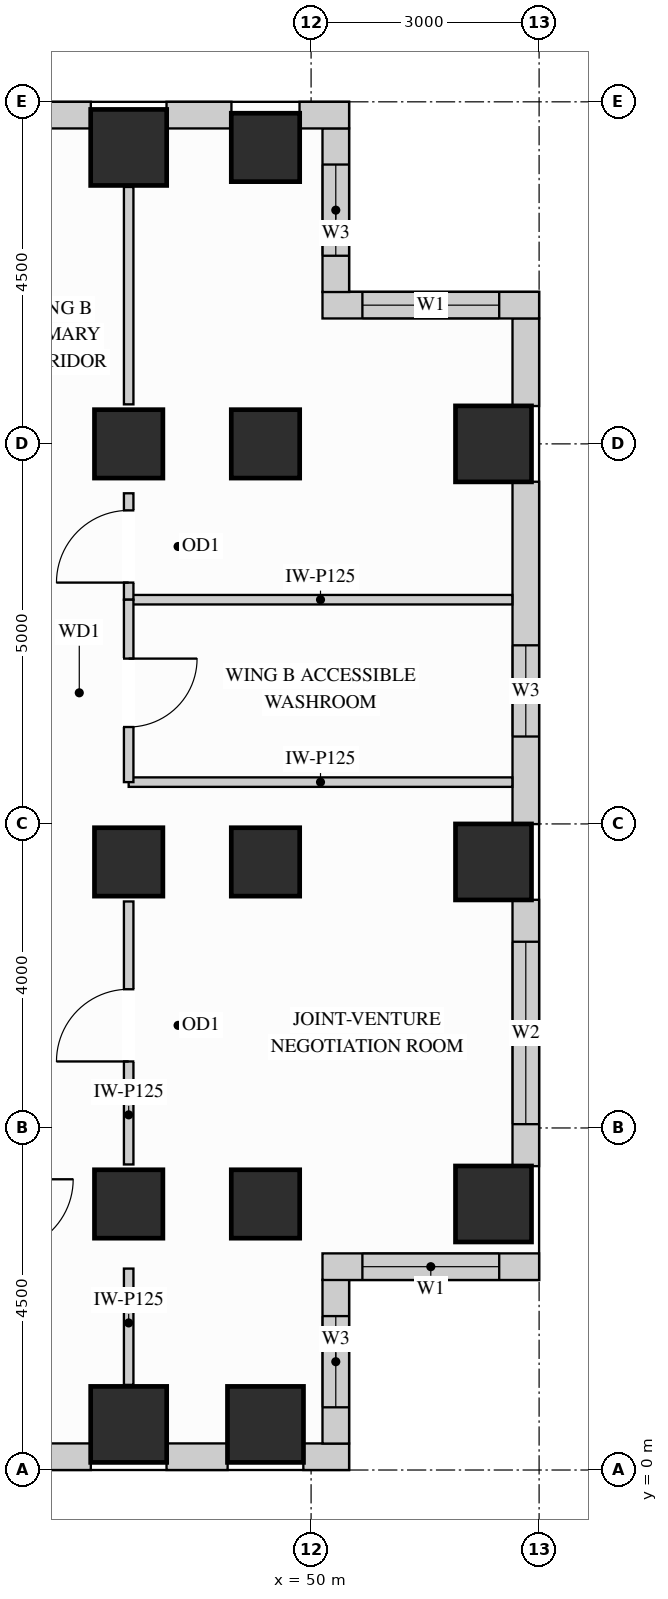
"""IFC4 building model, lengths in metres.
Left out: names, types, materials, properties, quantities, classifications, styles, units other than length and angle.
Written with IfcOpenShell. Run it as: python <this file> out.ifc"""

import sys

from ifc_helpers import new_model, si_unit, direction, frame, frame_2d, origin, origin_2d, place, context, subcontext, project, spatial, rectangle, extrude, source, transform, mapped, element, fill, save


model = new_model("IFC4")
c1 = context("Model", 3, precision=1e-05, world=origin(), true_north=direction((0.0, 1.0)))
c2 = subcontext(c1, "Body", "Model", "MODEL_VIEW")
j1 = project(units=[si_unit("LENGTHUNIT", "METRE"), si_unit("PLANEANGLEUNIT", "RADIAN")], contexts=[c1])
p1 = place(None, origin())
s1 = spatial("IfcSite", under=j1, at=p1, CompositionType="ELEMENT")
p2 = place(p1, origin())
s2 = spatial("IfcBuilding", under=s1, at=p2, CompositionType="ELEMENT")
p3 = place(p2, frame((0.0, 0.0, 164.7)))
s3 = spatial("IfcBuildingStorey", under=s2, at=p3, CompositionType="ELEMENT", Elevation=164.7)
m1 = source(origin(), c2, "Body", "SweptSolid", [
    extrude(rectangle(XDim=0.9, YDim=0.9, at=origin_2d()), origin(), (0.0, 0.0, 1.0), 3.4),
])
for number, where, z_axis, x_axis in (
    (1, (47.6, 13.5, 0.0), (0.0, 0.0, 1.0), (1.0, 0.0, 0.0)),
    (2, (47.6, 3.5, 0.0), (0.0, 0.0, 1.0), (1.0, 0.0, 0.0)),
    (3, (47.6, 8.0, 0.0), (0.0, 0.0, 1.0), (1.0, 0.0, 0.0)),
    (4, (49.4, 13.5, 0.0), (0.0, 0.0, 1.0), (1.0, 0.0, 0.0)),
    (5, (49.4, 17.4, 0.0), (0.0, 0.0, 1.0), (1.0, 0.0, 0.0)),
    (6, (49.4, 3.5, 0.0), (0.0, 0.0, 1.0), (1.0, 0.0, 0.0)),
    (7, (49.4, 8.0, 0.0), (0.0, 0.0, 1.0), (1.0, 0.0, 0.0)),
):
    element("IfcColumn", number, at=place(p3, frame(where, z_axis=z_axis, x_axis=x_axis)), inside=s3, PredefinedType="COLUMN", context=c2, shape_type="MappedRepresentation", body=[
        mapped(m1, transform((0.0, 0.0, 0.0), x_axis=(1.0, 0.0, 0.0), y_axis=(0.0, 1.0, 0.0), z_axis=(0.0, 0.0, 1.0))),
    ])
m2 = source(origin(), c2, "Body", "SweptSolid", [
    extrude(rectangle(XDim=1.0, YDim=1.0, at=origin_2d()), origin(), (0.0, 0.0, 1.0), 3.4),
])
for number, where, z_axis, x_axis in (
    (8, (47.6, 17.4, 0.0), (0.0, 0.0, 1.0), (1.0, 0.0, 0.0)),
    (9, (52.4, 13.5, 0.0), (0.0, 0.0, 1.0), (1.0, 0.0, 0.0)),
    (10, (52.4, 3.5, 0.0), (0.0, 0.0, 1.0), (1.0, 0.0, 0.0)),
    (11, (52.4, 8.0, 0.0), (0.0, 0.0, 1.0), (1.0, 0.0, 0.0)),
    (12, (47.6, 0.6, 0.0), (0.0, 0.0, 1.0), (1.0, 0.0, 0.0)),
    (13, (49.4, 0.6, 0.0), (0.0, 0.0, 1.0), (1.0, 0.0, 0.0)),
):
    element("IfcColumn", number, at=place(p3, frame(where, z_axis=z_axis, x_axis=x_axis)), inside=s3, PredefinedType="COLUMN", context=c2, shape_type="MappedRepresentation", body=[
        mapped(m2, transform((0.0, 0.0, 0.0), x_axis=(1.0, 0.0, 0.0), y_axis=(0.0, 1.0, 0.0), z_axis=(0.0, 0.0, 1.0))),
    ])
p4 = place(p3, frame((40.498, 0.175, 0.0), z_axis=(0.0, 0.0, 1.0), x_axis=(1.0, 0.0, 0.0)))
e14 = element("IfcWall", 14, at=p4, inside=s3, PredefinedType="SOLIDWALL", context=c2, shape_type="SweptSolid", body=[
    extrude(rectangle(XDim=6.604, YDim=0.35, at=frame_2d((3.302, 0.0))), origin(), (0.0, 0.0, 1.0), 2.612),
])
p5 = place(p4, frame((0.737, 0.0, 0.78)))
e15 = element("IfcOpeningElement", 15, at=p5, cuts=e14, PredefinedType="OPENING", context=c2, shape_type="SweptSolid", body=[
    extrude(rectangle(XDim=1.8, YDim=1.652, at=frame_2d((0.9, 0.826))), frame((0.0, 0.185, 0.0), z_axis=(0.0, -1.0, 0.0), x_axis=(1.0, 0.0, 0.0)), (0.0, 0.0, 1.0), 0.37),
])
p6 = place(p4, frame((2.955, 0.0, 0.78)))
e16 = element("IfcOpeningElement", 16, at=p6, cuts=e14, PredefinedType="OPENING", context=c2, shape_type="SweptSolid", body=[
    extrude(rectangle(XDim=1.8, YDim=1.652, at=frame_2d((0.9, 0.826))), frame((0.0, 0.185, 0.0), z_axis=(0.0, -1.0, 0.0), x_axis=(1.0, 0.0, 0.0)), (0.0, 0.0, 1.0), 0.37),
])
m3 = source(origin(), c2, "Body", "SweptSolid", [
    extrude(rectangle(XDim=0.804, YDim=0.35, at=frame_2d((0.402, 0.0))), origin(), (0.0, 0.0, 1.0), 3.385),
])
p7 = place(p3, frame((48.098, 0.175, 0.0), z_axis=(0.0, 0.0, 1.0), x_axis=(1.0, 0.0, 0.0)))
e17 = element("IfcWall", 17, at=p7, inside=s3, PredefinedType="SOLIDWALL", context=c2, shape_type="MappedRepresentation", body=[
    mapped(m3, transform((0.0, 0.0, 0.0), x_axis=(1.0, 0.0, 0.0), y_axis=(0.0, 1.0, 0.0), z_axis=(0.0, 0.0, 1.0))),
])
m4 = source(origin(), c2, "Body", "SweptSolid", [
    extrude(rectangle(XDim=0.602, YDim=0.35, at=frame_2d((0.301, 0.0))), origin(), (0.0, 0.0, 1.0), 3.385),
])
p8 = place(p3, frame((49.898, 0.175, 0.0), z_axis=(0.0, 0.0, 1.0), x_axis=(1.0, 0.0, 0.0)))
e18 = element("IfcWall", 18, at=p8, inside=s3, PredefinedType="SOLIDWALL", context=c2, shape_type="MappedRepresentation", body=[
    mapped(m4, transform((0.0, 0.0, 0.0), x_axis=(1.0, 0.0, 0.0), y_axis=(0.0, 1.0, 0.0), z_axis=(0.0, 0.0, 1.0))),
])
p9 = place(p3, frame((50.325, 0.348, 0.0), z_axis=(0.0, 0.0, 1.0), x_axis=(0.0, 1.0, 0.0)))
e19 = element("IfcWall", 19, at=p9, inside=s3, PredefinedType="SOLIDWALL", context=c2, shape_type="SweptSolid", body=[
    extrude(rectangle(XDim=2.154, YDim=0.35, at=frame_2d((1.077, 0.0))), origin(), (0.0, 0.0, 1.0), 3.385),
])
p10 = place(p9, frame((0.477, 0.0, 0.78)))
e20 = element("IfcOpeningElement", 20, at=p10, cuts=e19, PredefinedType="OPENING", context=c2, shape_type="SweptSolid", body=[
    extrude(rectangle(XDim=1.2, YDim=2.1, at=frame_2d((0.6, 1.05))), frame((0.0, 0.185, 0.0), z_axis=(0.0, -1.0, 0.0), x_axis=(1.0, 0.0, 0.0)), (0.0, 0.0, 1.0), 0.37),
])
p11 = place(p3, frame((50.15, 2.675, 0.0), z_axis=(0.0, 0.0, 1.0), x_axis=(1.0, 0.0, 0.0)))
e21 = element("IfcWall", 21, at=p11, inside=s3, PredefinedType="SOLIDWALL", context=c2, shape_type="SweptSolid", body=[
    extrude(rectangle(XDim=2.85, YDim=0.35, at=frame_2d((1.425, 0.0))), origin(), (0.0, 0.0, 1.0), 3.385),
])
p12 = place(p11, frame((0.525, 0.0, 0.78)))
e22 = element("IfcOpeningElement", 22, at=p12, cuts=e21, PredefinedType="OPENING", context=c2, shape_type="SweptSolid", body=[
    extrude(rectangle(XDim=1.8, YDim=2.1, at=frame_2d((0.9, 1.05))), frame((0.0, 0.185, 0.0), z_axis=(0.0, -1.0, 0.0), x_axis=(1.0, 0.0, 0.0)), (0.0, 0.0, 1.0), 0.37),
])
p13 = place(p3, frame((52.825, 3.998, 0.0), z_axis=(0.0, 0.0, 1.0), x_axis=(0.0, 1.0, 0.0)))
e23 = element("IfcWall", 23, at=p13, inside=s3, PredefinedType="SOLIDWALL", context=c2, shape_type="SweptSolid", body=[
    extrude(rectangle(XDim=3.504, YDim=0.35, at=frame_2d((1.752, 0.0))), origin(), (0.0, 0.0, 1.0), 2.612),
])
p14 = place(p13, frame((0.552, 0.0, 0.78)))
e24 = element("IfcOpeningElement", 24, at=p14, cuts=e23, PredefinedType="OPENING", context=c2, shape_type="SweptSolid", body=[
    extrude(rectangle(XDim=2.4, YDim=1.652, at=frame_2d((1.2, 0.826))), frame((0.0, 0.185, 0.0), z_axis=(0.0, -1.0, 0.0), x_axis=(1.0, 0.0, 0.0)), (0.0, 0.0, 1.0), 0.37),
])
p15 = place(p3, frame((52.825, 8.498, 0.0), z_axis=(0.0, 0.0, 1.0), x_axis=(0.0, 1.0, 0.0)))
e25 = element("IfcWall", 25, at=p15, inside=s3, PredefinedType="SOLIDWALL", context=c2, shape_type="SweptSolid", body=[
    extrude(rectangle(XDim=4.504, YDim=0.35, at=frame_2d((2.252, 0.0))), origin(), (0.0, 0.0, 1.0), 2.612),
])
p16 = place(p15, frame((1.152, 0.0, 0.78)))
e26 = element("IfcOpeningElement", 26, at=p16, cuts=e25, PredefinedType="OPENING", context=c2, shape_type="SweptSolid", body=[
    extrude(rectangle(XDim=1.2, YDim=1.652, at=frame_2d((0.6, 0.826))), frame((0.0, 0.185, 0.0), z_axis=(0.0, -1.0, 0.0), x_axis=(1.0, 0.0, 0.0)), (0.0, 0.0, 1.0), 0.37),
])
m5 = source(origin(), c2, "Body", "SweptSolid", [
    extrude(rectangle(XDim=1.154, YDim=0.35, at=frame_2d((0.577, 0.0))), origin(), (0.0, 0.0, 1.0), 3.385),
])
p17 = place(p3, frame((52.825, 13.998, 0.0), z_axis=(0.0, 0.0, 1.0), x_axis=(0.0, 1.0, 0.0)))
e27 = element("IfcWall", 27, at=p17, inside=s3, PredefinedType="SOLIDWALL", context=c2, shape_type="MappedRepresentation", body=[
    mapped(m5, transform((0.0, 0.0, 0.0), x_axis=(1.0, 0.0, 0.0), y_axis=(0.0, 1.0, 0.0), z_axis=(0.0, 0.0, 1.0))),
])
p18 = place(p3, frame((53.0, 15.325, 0.0), z_axis=(0.0, 0.0, 1.0), x_axis=(-1.0, 0.0, 0.0)))
e28 = element("IfcWall", 28, at=p18, inside=s3, PredefinedType="SOLIDWALL", context=c2, shape_type="SweptSolid", body=[
    extrude(rectangle(XDim=2.85, YDim=0.35, at=frame_2d((1.425, 0.0))), origin(), (0.0, 0.0, 1.0), 3.385),
])
p19 = place(p18, frame((0.525, 0.0, 0.78)))
e29 = element("IfcOpeningElement", 29, at=p19, cuts=e28, PredefinedType="OPENING", context=c2, shape_type="SweptSolid", body=[
    extrude(rectangle(XDim=1.8, YDim=2.1, at=frame_2d((0.9, 1.05))), frame((0.0, 0.185, 0.0), z_axis=(0.0, -1.0, 0.0), x_axis=(1.0, 0.0, 0.0)), (0.0, 0.0, 1.0), 0.37),
])
p20 = place(p3, frame((50.325, 15.498, 0.0), z_axis=(0.0, 0.0, 1.0), x_axis=(0.0, 1.0, 0.0)))
e30 = element("IfcWall", 30, at=p20, inside=s3, PredefinedType="SOLIDWALL", context=c2, shape_type="SweptSolid", body=[
    extrude(rectangle(XDim=2.154, YDim=0.35, at=frame_2d((1.077, 0.0))), origin(), (0.0, 0.0, 1.0), 3.385),
])
p21 = place(p20, frame((0.477, 0.0, 0.78)))
e31 = element("IfcOpeningElement", 31, at=p21, cuts=e30, PredefinedType="OPENING", context=c2, shape_type="SweptSolid", body=[
    extrude(rectangle(XDim=1.2, YDim=2.1, at=frame_2d((0.6, 1.05))), frame((0.0, 0.185, 0.0), z_axis=(0.0, -1.0, 0.0), x_axis=(1.0, 0.0, 0.0)), (0.0, 0.0, 1.0), 0.37),
])
m6 = source(origin(), c2, "Body", "SweptSolid", [
    extrude(rectangle(XDim=0.652, YDim=0.35, at=frame_2d((0.326, 0.0))), origin(), (0.0, 0.0, 1.0), 3.385),
])
p22 = place(p3, frame((50.5, 17.825, 0.0), z_axis=(0.0, 0.0, 1.0), x_axis=(-1.0, 0.0, 0.0)))
e32 = element("IfcWall", 32, at=p22, inside=s3, PredefinedType="SOLIDWALL", context=c2, shape_type="MappedRepresentation", body=[
    mapped(m6, transform((0.0, 0.0, 0.0), x_axis=(1.0, 0.0, 0.0), y_axis=(0.0, 1.0, 0.0), z_axis=(0.0, 0.0, 1.0))),
])
m7 = source(origin(), c2, "Body", "SweptSolid", [
    extrude(rectangle(XDim=0.854, YDim=0.35, at=frame_2d((0.427, 0.0))), origin(), (0.0, 0.0, 1.0), 3.385),
])
p23 = place(p3, frame((48.952, 17.825, 0.0), z_axis=(0.0, 0.0, 1.0), x_axis=(-1.0, 0.0, 0.0)))
e33 = element("IfcWall", 33, at=p23, inside=s3, PredefinedType="SOLIDWALL", context=c2, shape_type="MappedRepresentation", body=[
    mapped(m7, transform((0.0, 0.0, 0.0), x_axis=(1.0, 0.0, 0.0), y_axis=(0.0, 1.0, 0.0), z_axis=(0.0, 0.0, 1.0))),
])
p24 = place(p3, frame((47.102, 17.825, 0.0), z_axis=(0.0, 0.0, 1.0), x_axis=(-1.0, 0.0, 0.0)))
e34 = element("IfcWall", 34, at=p24, inside=s3, PredefinedType="SOLIDWALL", context=c2, shape_type="SweptSolid", body=[
    extrude(rectangle(XDim=6.604, YDim=0.35, at=frame_2d((3.302, 0.0))), origin(), (0.0, 0.0, 1.0), 2.612),
])
p25 = place(p24, frame((1.849, 0.0, 0.78)))
e35 = element("IfcOpeningElement", 35, at=p25, cuts=e34, PredefinedType="OPENING", context=c2, shape_type="SweptSolid", body=[
    extrude(rectangle(XDim=1.8, YDim=1.652, at=frame_2d((0.9, 0.826))), frame((0.0, 0.185, 0.0), z_axis=(0.0, -1.0, 0.0), x_axis=(1.0, 0.0, 0.0)), (0.0, 0.0, 1.0), 0.37),
])
p26 = place(p24, frame((4.067, 0.0, 0.78)))
e36 = element("IfcOpeningElement", 36, at=p26, cuts=e34, PredefinedType="OPENING", context=c2, shape_type="SweptSolid", body=[
    extrude(rectangle(XDim=1.8, YDim=1.652, at=frame_2d((0.9, 0.826))), frame((0.0, 0.185, 0.0), z_axis=(0.0, -1.0, 0.0), x_axis=(1.0, 0.0, 0.0)), (0.0, 0.0, 1.0), 0.37),
])
m8 = source(origin(), c2, "Body", "SweptSolid", [
    extrude(rectangle(XDim=5.048, YDim=0.125, at=frame_2d((2.524, 0.0))), origin(), (0.0, 0.0, 1.0), 3.385),
])
for number, where, z_axis, x_axis in (
    (37, (47.6, 11.45, 0.0), (0.0, 0.0, 1.0), (1.0, 0.0, 0.0)),
    (38, (47.6, 9.05, 0.0), (0.0, 0.0, 1.0), (1.0, 0.0, 0.0)),
):
    element("IfcWall", number, at=place(p3, frame(where, z_axis=z_axis, x_axis=x_axis)), inside=s3, PredefinedType="PARTITIONING", context=c2, shape_type="MappedRepresentation", body=[
        mapped(m8, transform((0.0, 0.0, 0.0), x_axis=(1.0, 0.0, 0.0), y_axis=(0.0, 1.0, 0.0), z_axis=(0.0, 0.0, 1.0))),
    ])
p27 = place(p3, frame((47.6, 4.02, 0.0), z_axis=(0.0, 0.0, 1.0), x_axis=(0.0, 1.0, 0.0)))
e39 = element("IfcWall", 39, at=p27, inside=s3, PredefinedType="PARTITIONING", context=c2, shape_type="SweptSolid", body=[
    extrude(rectangle(XDim=3.46, YDim=0.125, at=frame_2d((1.73, 0.0))), origin(), (0.0, 0.0, 1.0), 2.773),
])
p28 = place(p27, frame((1.355, 0.0, 0.0)))
e40 = element("IfcOpeningElement", 40, at=p28, cuts=e39, PredefinedType="OPENING", context=c2, shape_type="SweptSolid", body=[
    extrude(rectangle(XDim=0.95, YDim=2.15, at=frame_2d((0.475, 1.075))), frame((0.0, 0.073, 0.0), z_axis=(0.0, -1.0, 0.0), x_axis=(1.0, 0.0, 0.0)), (0.0, 0.0, 1.0), 0.145),
])
m9 = source(origin(), c2, "Body", "SweptSolid", [
    extrude(rectangle(XDim=1.53, YDim=0.125, at=frame_2d((0.765, 0.0))), origin(), (0.0, 0.0, 1.0), 2.773),
])
p29 = place(p3, frame((47.6, 1.12, 0.0), z_axis=(0.0, 0.0, 1.0), x_axis=(0.0, 1.0, 0.0)))
e41 = element("IfcWall", 41, at=p29, inside=s3, PredefinedType="PARTITIONING", context=c2, shape_type="MappedRepresentation", body=[
    mapped(m9, transform((0.0, 0.0, 0.0), x_axis=(1.0, 0.0, 0.0), y_axis=(0.0, 1.0, 0.0), z_axis=(0.0, 0.0, 1.0))),
])
p30 = place(p3, frame((47.6, 11.45, 0.0), z_axis=(0.0, 0.0, 1.0), x_axis=(0.0, 1.0, 0.0)))
e42 = element("IfcWall", 42, at=p30, inside=s3, PredefinedType="PARTITIONING", context=c2, shape_type="SweptSolid", body=[
    extrude(rectangle(XDim=1.4, YDim=0.125, at=frame_2d((0.7, 0.0))), origin(), (0.0, 0.0, 1.0), 2.773),
])
p31 = place(p30, frame((0.225, 0.0, 0.0)))
e43 = element("IfcOpeningElement", 43, at=p31, cuts=e42, PredefinedType="OPENING", context=c2, shape_type="SweptSolid", body=[
    extrude(rectangle(XDim=0.95, YDim=2.15, at=frame_2d((0.475, 1.075))), frame((0.0, 0.073, 0.0), z_axis=(0.0, -1.0, 0.0), x_axis=(1.0, 0.0, 0.0)), (0.0, 0.0, 1.0), 0.145),
])
m10 = source(origin(), c2, "Body", "SweptSolid", [
    extrude(rectangle(XDim=2.86, YDim=0.125, at=frame_2d((1.43, 0.0))), origin(), (0.0, 0.0, 1.0), 2.773),
])
p32 = place(p3, frame((47.6, 14.02, 0.0), z_axis=(0.0, 0.0, 1.0), x_axis=(0.0, 1.0, 0.0)))
e44 = element("IfcWall", 44, at=p32, inside=s3, PredefinedType="PARTITIONING", context=c2, shape_type="MappedRepresentation", body=[
    mapped(m10, transform((0.0, 0.0, 0.0), x_axis=(1.0, 0.0, 0.0), y_axis=(0.0, 1.0, 0.0), z_axis=(0.0, 0.0, 1.0))),
])
p33 = place(p3, frame((47.6, 9.05, 0.0), z_axis=(0.0, 0.0, 1.0), x_axis=(0.0, 1.0, 0.0)))
e45 = element("IfcWall", 45, at=p33, inside=s3, PredefinedType="PARTITIONING", context=c2, shape_type="SweptSolid", body=[
    extrude(rectangle(XDim=2.4, YDim=0.125, at=frame_2d((1.2, 0.0))), origin(), (0.0, 0.0, 1.0), 2.773),
])
p34 = place(p33, frame((0.725, 0.0, 0.0)))
e46 = element("IfcOpeningElement", 46, at=p34, cuts=e45, PredefinedType="OPENING", context=c2, shape_type="SweptSolid", body=[
    extrude(rectangle(XDim=0.9, YDim=2.15, at=frame_2d((0.45, 1.075))), frame((0.0, 0.073, 0.0), z_axis=(0.0, -1.0, 0.0), x_axis=(1.0, 0.0, 0.0)), (0.0, 0.0, 1.0), 0.145),
])
m11 = source(origin(), c2, "Body", "SweptSolid", [
    extrude(rectangle(XDim=0.95, YDim=2.15, at=frame_2d((0.475, 1.075))), frame((0.0, 0.025, 0.0), z_axis=(0.0, -1.0, 0.0), x_axis=(1.0, 0.0, 0.0)), (0.0, 0.0, 1.0), 0.05),
])
p35 = place(p28, origin())
e47 = element("IfcDoor", 47, at=p35, inside=s3, OperationType="SINGLE_SWING_LEFT", PredefinedType="DOOR", context=c2, shape_type="MappedRepresentation", body=[
    mapped(m11, transform((0.0, 0.0, 0.0), x_axis=(1.0, 0.0, 0.0), y_axis=(0.0, 1.0, 0.0), z_axis=(0.0, 0.0, 1.0))),
])
fill(e40, e47)
p36 = place(p31, origin())
e48 = element("IfcDoor", 48, at=p36, inside=s3, OperationType="SINGLE_SWING_LEFT", PredefinedType="DOOR", context=c2, shape_type="MappedRepresentation", body=[
    mapped(m11, transform((0.0, 0.0, 0.0), x_axis=(1.0, 0.0, 0.0), y_axis=(0.0, 1.0, 0.0), z_axis=(0.0, 0.0, 1.0))),
])
fill(e43, e48)
m12 = source(origin(), c2, "Body", "SweptSolid", [
    extrude(rectangle(XDim=0.9, YDim=2.15, at=frame_2d((0.45, 1.075))), frame((0.0, 0.025, 0.0), z_axis=(0.0, -1.0, 0.0), x_axis=(1.0, 0.0, 0.0)), (0.0, 0.0, 1.0), 0.05),
])
p37 = place(p34, origin())
e49 = element("IfcDoor", 49, at=p37, inside=s3, OperationType="SINGLE_SWING_RIGHT", PredefinedType="DOOR", context=c2, shape_type="MappedRepresentation", body=[
    mapped(m12, transform((0.0, 0.0, 0.0), x_axis=(1.0, 0.0, 0.0), y_axis=(0.0, 1.0, 0.0), z_axis=(0.0, 0.0, 1.0))),
])
fill(e46, e49)
m13 = source(origin(), c2, "Body", "SweptSolid", [
    extrude(rectangle(XDim=1.8, YDim=2.1, at=frame_2d((0.9, 1.05))), frame((0.0, 0.03, 0.0), z_axis=(0.0, -1.0, 0.0), x_axis=(1.0, 0.0, 0.0)), (0.0, 0.0, 1.0), 0.06),
])
p38 = place(p12, origin())
e50 = element("IfcWindow", 50, at=p38, inside=s3, PartitioningType="SINGLE_PANEL", PredefinedType="WINDOW", context=c2, shape_type="MappedRepresentation", body=[
    mapped(m13, transform((0.0, 0.0, 0.0), x_axis=(1.0, 0.0, 0.0), y_axis=(0.0, 1.0, 0.0), z_axis=(0.0, 0.0, 1.0))),
])
fill(e22, e50)
p39 = place(p19, origin())
e51 = element("IfcWindow", 51, at=p39, inside=s3, PartitioningType="SINGLE_PANEL", PredefinedType="WINDOW", context=c2, shape_type="MappedRepresentation", body=[
    mapped(m13, transform((0.0, 0.0, 0.0), x_axis=(1.0, 0.0, 0.0), y_axis=(0.0, 1.0, 0.0), z_axis=(0.0, 0.0, 1.0))),
])
fill(e29, e51)
m14 = source(origin(), c2, "Body", "SweptSolid", [
    extrude(rectangle(XDim=2.4, YDim=1.652, at=frame_2d((1.2, 0.826))), frame((0.0, 0.03, 0.0), z_axis=(0.0, -1.0, 0.0), x_axis=(1.0, 0.0, 0.0)), (0.0, 0.0, 1.0), 0.06),
])
p40 = place(p14, origin())
e52 = element("IfcWindow", 52, at=p40, inside=s3, PartitioningType="SINGLE_PANEL", PredefinedType="WINDOW", context=c2, shape_type="MappedRepresentation", body=[
    mapped(m14, transform((0.0, 0.0, 0.0), x_axis=(1.0, 0.0, 0.0), y_axis=(0.0, 1.0, 0.0), z_axis=(0.0, 0.0, 1.0))),
])
fill(e24, e52)
m15 = source(origin(), c2, "Body", "SweptSolid", [
    extrude(rectangle(XDim=1.2, YDim=2.1, at=frame_2d((0.6, 1.05))), frame((0.0, 0.03, 0.0), z_axis=(0.0, -1.0, 0.0), x_axis=(1.0, 0.0, 0.0)), (0.0, 0.0, 1.0), 0.06),
])
p41 = place(p10, origin())
e53 = element("IfcWindow", 53, at=p41, inside=s3, PartitioningType="SINGLE_PANEL", PredefinedType="WINDOW", context=c2, shape_type="MappedRepresentation", body=[
    mapped(m15, transform((0.0, 0.0, 0.0), x_axis=(1.0, 0.0, 0.0), y_axis=(0.0, 1.0, 0.0), z_axis=(0.0, 0.0, 1.0))),
])
fill(e20, e53)
m16 = source(origin(), c2, "Body", "SweptSolid", [
    extrude(rectangle(XDim=1.2, YDim=1.652, at=frame_2d((0.6, 0.826))), frame((0.0, 0.03, 0.0), z_axis=(0.0, -1.0, 0.0), x_axis=(1.0, 0.0, 0.0)), (0.0, 0.0, 1.0), 0.06),
])
p42 = place(p16, origin())
e54 = element("IfcWindow", 54, at=p42, inside=s3, PartitioningType="SINGLE_PANEL", PredefinedType="WINDOW", context=c2, shape_type="MappedRepresentation", body=[
    mapped(m16, transform((0.0, 0.0, 0.0), x_axis=(1.0, 0.0, 0.0), y_axis=(0.0, 1.0, 0.0), z_axis=(0.0, 0.0, 1.0))),
])
fill(e26, e54)
p43 = place(p21, origin())
e55 = element("IfcWindow", 55, at=p43, inside=s3, PartitioningType="SINGLE_PANEL", PredefinedType="WINDOW", context=c2, shape_type="MappedRepresentation", body=[
    mapped(m15, transform((0.0, 0.0, 0.0), x_axis=(1.0, 0.0, 0.0), y_axis=(0.0, 1.0, 0.0), z_axis=(0.0, 0.0, 1.0))),
])
fill(e31, e55)
save(model, sys.argv[1])
